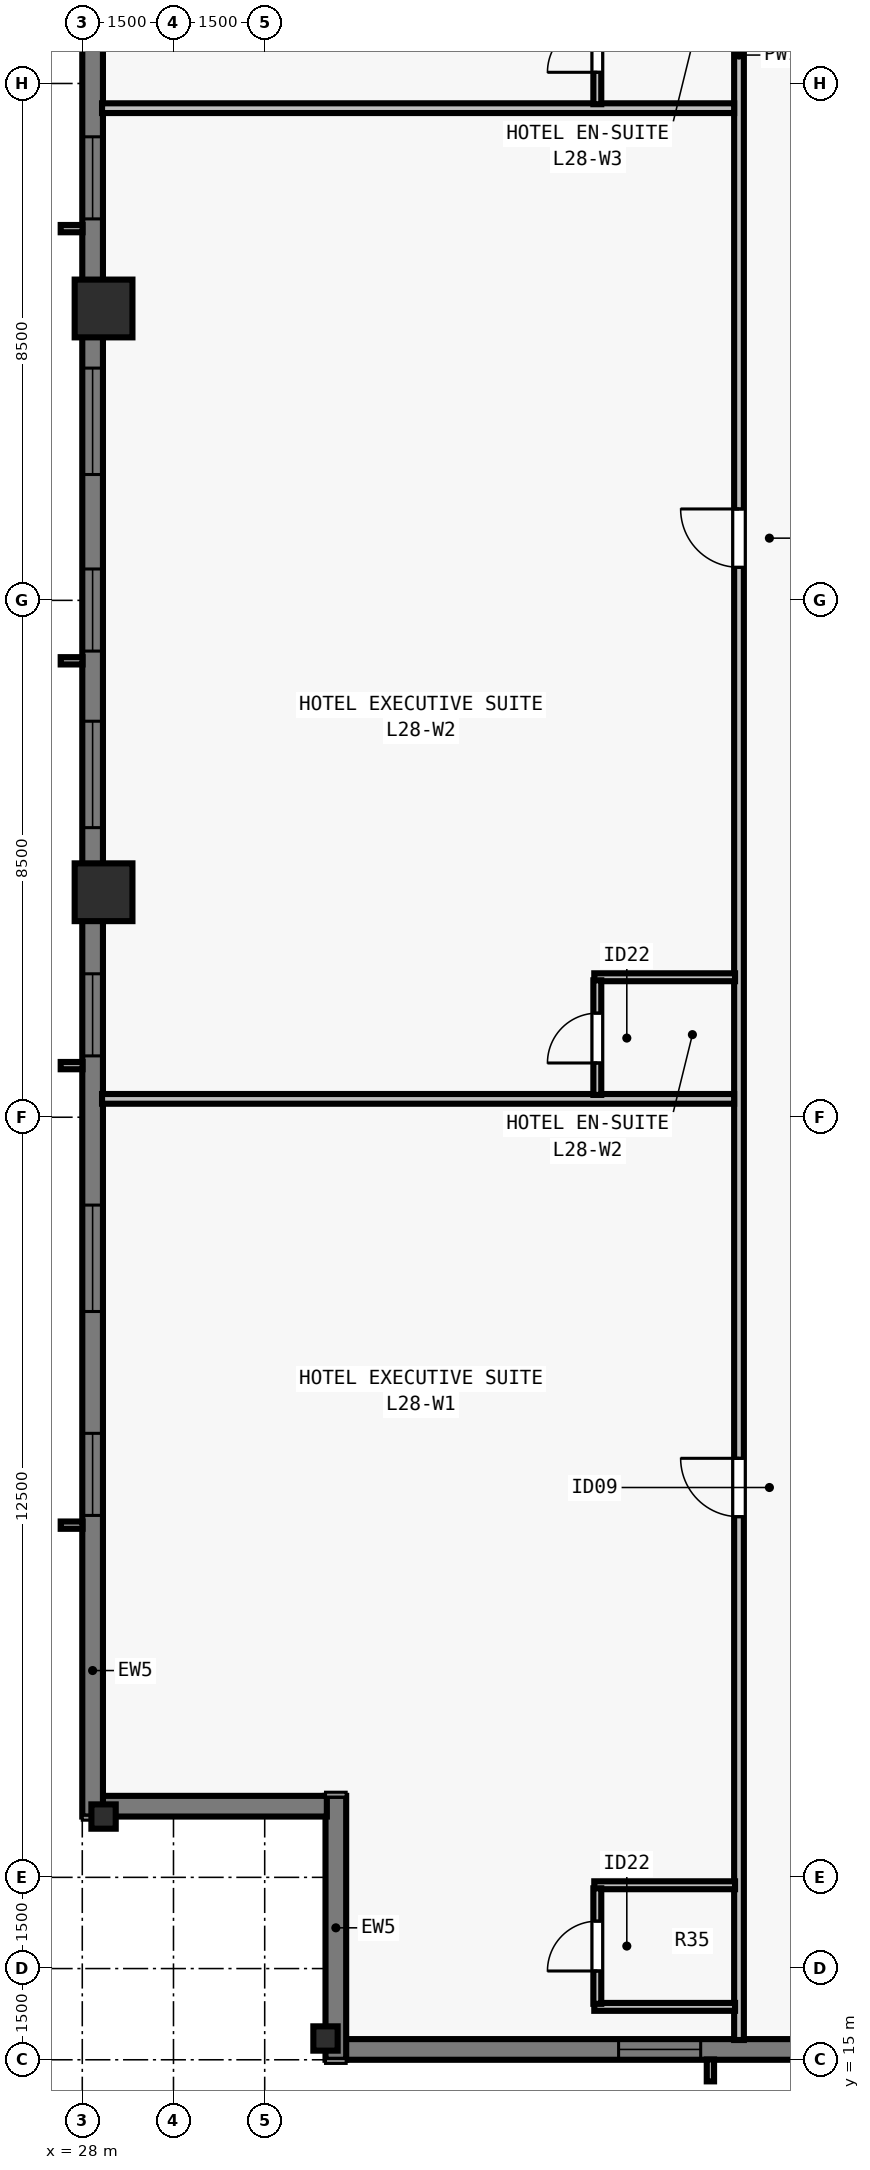
"""IFC4 building model, lengths in metres.
Left out: names, types, materials, properties, quantities, classifications, styles, units other than length and angle.
Written with IfcOpenShell. Run it as: python <this file> out.ifc"""

import sys

from ifc_helpers import new_model, si_unit, direction, frame, frame_2d, origin, origin_2d, place, context, subcontext, project, spatial, rectangle, i_section, extrude, element, fill, save


model = new_model("IFC4")
c1 = context("Model", 3, precision=1e-05, world=origin(), true_north=direction((0.0, 1.0)))
c2 = subcontext(c1, "Body", "Model", "MODEL_VIEW")
j1 = project(units=[si_unit("LENGTHUNIT", "METRE"), si_unit("PLANEANGLEUNIT", "RADIAN")], contexts=[c1])
p1 = place(None, origin())
s1 = spatial("IfcSite", under=j1, at=p1, CompositionType="ELEMENT")
p2 = place(p1, origin())
s2 = spatial("IfcBuilding", under=s1, at=p2, CompositionType="ELEMENT")
p3 = place(p2, frame((0.0, 0.0, 106.0)))
s3 = spatial("IfcBuildingStorey", under=s2, at=p3, CompositionType="ELEMENT", Elevation=106.0)
p4 = place(p3, frame((32.0, 15.35, 0.0), z_axis=(0.0, 0.0, 1.0), x_axis=(1.0, 0.0, 0.0)))
e1 = element("IfcColumn", 1, at=p4, inside=s3, PredefinedType="COLUMN", context=c2, shape_type="SweptSolid", body=[
    extrude(i_section(OverallWidth=0.4, OverallDepth=0.4, WebThickness=0.022, FlangeThickness=0.036, at=origin_2d()), origin(), (0.0, 0.0, 1.0), 3.5),
])
for number, where, z_axis, x_axis in (
    (2, (28.35, 43.8, 0.0), (0.0, 0.0, 1.0), (0.0, 1.0, 0.0)),
    (3, (28.35, 34.2, 0.0), (0.0, 0.0, 1.0), (0.0, 1.0, 0.0)),
):
    element("IfcColumn", number, at=place(p3, frame(where, z_axis=z_axis, x_axis=x_axis)), inside=s3, PredefinedType="COLUMN", context=c2, shape_type="SweptSolid", body=[
        extrude(rectangle(XDim=0.95, YDim=0.95, at=origin_2d()), origin(), (0.0, 0.0, 1.0), 3.5),
    ])
p5 = place(p3, frame((28.35, 19.0, 0.0), z_axis=(0.0, 0.0, 1.0), x_axis=(0.0, 1.0, 0.0)))
e4 = element("IfcColumn", 4, at=p5, inside=s3, PredefinedType="COLUMN", context=c2, shape_type="SweptSolid", body=[
    extrude(i_section(OverallWidth=0.4, OverallDepth=0.4, WebThickness=0.022, FlangeThickness=0.036, at=origin_2d()), origin(), (0.0, 0.0, 1.0), 3.5),
])
p6 = place(p3, frame((72.0, 15.17, 0.0), z_axis=(0.0, 0.0, 1.0), x_axis=(-1.0, 0.0, 0.0)))
e5 = element("IfcWall", 5, at=p6, inside=s3, PredefinedType="SOLIDWALL", context=c2, shape_type="SweptSolid", body=[
    extrude(rectangle(XDim=39.682, YDim=0.34, at=frame_2d((19.841, 0.0))), origin(), (0.0, 0.0, 1.0), 3.28),
])
p7 = place(p6, frame((4.952, 0.0, 0.8)))
e6 = element("IfcOpeningElement", 6, at=p7, cuts=e5, PredefinedType="OPENING", context=c2, shape_type="SweptSolid", body=[
    extrude(rectangle(XDim=1.35, YDim=1.66, at=frame_2d((0.675, 0.83))), frame((0.0, 0.18, 0.0), z_axis=(0.0, -1.0, 0.0), x_axis=(1.0, 0.0, 0.0)), (0.0, 0.0, 1.0), 0.36),
])
p8 = place(p6, frame((9.555, 0.0, 0.8)))
e7 = element("IfcOpeningElement", 7, at=p8, cuts=e5, PredefinedType="OPENING", context=c2, shape_type="SweptSolid", body=[
    extrude(rectangle(XDim=1.75, YDim=1.66, at=frame_2d((0.875, 0.83))), frame((0.0, 0.18, 0.0), z_axis=(0.0, -1.0, 0.0), x_axis=(1.0, 0.0, 0.0)), (0.0, 0.0, 1.0), 0.36),
])
p9 = place(p6, frame((12.059, 0.0, 0.8)))
e8 = element("IfcOpeningElement", 8, at=p9, cuts=e5, PredefinedType="OPENING", context=c2, shape_type="SweptSolid", body=[
    extrude(rectangle(XDim=1.35, YDim=1.66, at=frame_2d((0.675, 0.83))), frame((0.0, 0.18, 0.0), z_axis=(0.0, -1.0, 0.0), x_axis=(1.0, 0.0, 0.0)), (0.0, 0.0, 1.0), 0.36),
])
p10 = place(p6, frame((16.262, 0.0, 0.8)))
e9 = element("IfcOpeningElement", 9, at=p10, cuts=e5, PredefinedType="OPENING", context=c2, shape_type="SweptSolid", body=[
    extrude(rectangle(XDim=1.75, YDim=1.66, at=frame_2d((0.875, 0.83))), frame((0.0, 0.18, 0.0), z_axis=(0.0, -1.0, 0.0), x_axis=(1.0, 0.0, 0.0)), (0.0, 0.0, 1.0), 0.36),
])
p11 = place(p6, frame((18.716, 0.0, 0.8)))
e10 = element("IfcOpeningElement", 10, at=p11, cuts=e5, PredefinedType="OPENING", context=c2, shape_type="SweptSolid", body=[
    extrude(rectangle(XDim=1.35, YDim=1.66, at=frame_2d((0.675, 0.83))), frame((0.0, 0.18, 0.0), z_axis=(0.0, -1.0, 0.0), x_axis=(1.0, 0.0, 0.0)), (0.0, 0.0, 1.0), 0.36),
])
p12 = place(p6, frame((22.07, 0.0, 0.8)))
e11 = element("IfcOpeningElement", 11, at=p12, cuts=e5, PredefinedType="OPENING", context=c2, shape_type="SweptSolid", body=[
    extrude(rectangle(XDim=1.75, YDim=1.66, at=frame_2d((0.875, 0.83))), frame((0.0, 0.18, 0.0), z_axis=(0.0, -1.0, 0.0), x_axis=(1.0, 0.0, 0.0)), (0.0, 0.0, 1.0), 0.36),
])
p13 = place(p6, frame((26.273, 0.0, 0.8)))
e12 = element("IfcOpeningElement", 12, at=p13, cuts=e5, PredefinedType="OPENING", context=c2, shape_type="SweptSolid", body=[
    extrude(rectangle(XDim=1.35, YDim=1.66, at=frame_2d((0.675, 0.83))), frame((0.0, 0.18, 0.0), z_axis=(0.0, -1.0, 0.0), x_axis=(1.0, 0.0, 0.0)), (0.0, 0.0, 1.0), 0.36),
])
p14 = place(p6, frame((28.777, 0.0, 0.8)))
e13 = element("IfcOpeningElement", 13, at=p14, cuts=e5, PredefinedType="OPENING", context=c2, shape_type="SweptSolid", body=[
    extrude(rectangle(XDim=1.75, YDim=1.66, at=frame_2d((0.875, 0.83))), frame((0.0, 0.18, 0.0), z_axis=(0.0, -1.0, 0.0), x_axis=(1.0, 0.0, 0.0)), (0.0, 0.0, 1.0), 0.36),
])
p15 = place(p6, frame((33.83, 0.0, 0.8)))
e14 = element("IfcOpeningElement", 14, at=p15, cuts=e5, PredefinedType="OPENING", context=c2, shape_type="SweptSolid", body=[
    extrude(rectangle(XDim=1.35, YDim=1.66, at=frame_2d((0.675, 0.83))), frame((0.0, 0.18, 0.0), z_axis=(0.0, -1.0, 0.0), x_axis=(1.0, 0.0, 0.0)), (0.0, 0.0, 1.0), 0.36),
])
p16 = place(p3, frame((32.17, 15.0, 0.0), z_axis=(0.0, 0.0, 1.0), x_axis=(0.0, 1.0, 0.0)))
e15 = element("IfcWall", 15, at=p16, inside=s3, PredefinedType="SOLIDWALL", context=c2, shape_type="SweptSolid", body=[
    extrude(rectangle(XDim=4.34, YDim=0.34, at=frame_2d((2.17, 0.0))), origin(), (0.0, 0.0, 1.0), 3.28),
])
p17 = place(p3, frame((32.022, 19.17, 0.0), z_axis=(0.0, 0.0, 1.0), x_axis=(-1.0, 0.0, 0.0)))
e16 = element("IfcWall", 16, at=p17, inside=s3, PredefinedType="SOLIDWALL", context=c2, shape_type="SweptSolid", body=[
    extrude(rectangle(XDim=3.704, YDim=0.34, at=frame_2d((1.852, 0.0))), origin(), (0.0, 0.0, 1.0), 3.28),
])
p18 = place(p3, frame((28.17, 19.0, 0.0), z_axis=(0.0, 0.0, 1.0), x_axis=(0.0, 1.0, 0.0)))
e17 = element("IfcWall", 17, at=p18, inside=s3, PredefinedType="SOLIDWALL", context=c2, shape_type="SweptSolid", body=[
    extrude(rectangle(XDim=39.682, YDim=0.34, at=frame_2d((19.841, 0.0))), origin(), (0.0, 0.0, 1.0), 3.28),
])
p19 = place(p18, frame((4.952, 0.0, 0.8)))
e18 = element("IfcOpeningElement", 18, at=p19, cuts=e17, PredefinedType="OPENING", context=c2, shape_type="SweptSolid", body=[
    extrude(rectangle(XDim=1.35, YDim=1.66, at=frame_2d((0.675, 0.83))), frame((0.0, 0.18, 0.0), z_axis=(0.0, -1.0, 0.0), x_axis=(1.0, 0.0, 0.0)), (0.0, 0.0, 1.0), 0.36),
])
p20 = place(p18, frame((8.305, 0.0, 0.8)))
e19 = element("IfcOpeningElement", 19, at=p20, cuts=e17, PredefinedType="OPENING", context=c2, shape_type="SweptSolid", body=[
    extrude(rectangle(XDim=1.75, YDim=1.66, at=frame_2d((0.875, 0.83))), frame((0.0, 0.18, 0.0), z_axis=(0.0, -1.0, 0.0), x_axis=(1.0, 0.0, 0.0)), (0.0, 0.0, 1.0), 0.36),
])
p21 = place(p18, frame((12.509, 0.0, 0.8)))
e20 = element("IfcOpeningElement", 20, at=p21, cuts=e17, PredefinedType="OPENING", context=c2, shape_type="SweptSolid", body=[
    extrude(rectangle(XDim=1.35, YDim=1.66, at=frame_2d((0.675, 0.83))), frame((0.0, 0.18, 0.0), z_axis=(0.0, -1.0, 0.0), x_axis=(1.0, 0.0, 0.0)), (0.0, 0.0, 1.0), 0.36),
])
p22 = place(p18, frame((16.262, 0.0, 0.8)))
e21 = element("IfcOpeningElement", 21, at=p22, cuts=e17, PredefinedType="OPENING", context=c2, shape_type="SweptSolid", body=[
    extrude(rectangle(XDim=1.75, YDim=1.66, at=frame_2d((0.875, 0.83))), frame((0.0, 0.18, 0.0), z_axis=(0.0, -1.0, 0.0), x_axis=(1.0, 0.0, 0.0)), (0.0, 0.0, 1.0), 0.36),
])
p23 = place(p18, frame((19.166, 0.0, 0.8)))
e22 = element("IfcOpeningElement", 22, at=p23, cuts=e17, PredefinedType="OPENING", context=c2, shape_type="SweptSolid", body=[
    extrude(rectangle(XDim=1.35, YDim=1.66, at=frame_2d((0.675, 0.83))), frame((0.0, 0.18, 0.0), z_axis=(0.0, -1.0, 0.0), x_axis=(1.0, 0.0, 0.0)), (0.0, 0.0, 1.0), 0.36),
])
p24 = place(p18, frame((22.07, 0.0, 0.8)))
e23 = element("IfcOpeningElement", 23, at=p24, cuts=e17, PredefinedType="OPENING", context=c2, shape_type="SweptSolid", body=[
    extrude(rectangle(XDim=1.75, YDim=1.66, at=frame_2d((0.875, 0.83))), frame((0.0, 0.18, 0.0), z_axis=(0.0, -1.0, 0.0), x_axis=(1.0, 0.0, 0.0)), (0.0, 0.0, 1.0), 0.36),
])
p25 = place(p18, frame((26.273, 0.0, 0.8)))
e24 = element("IfcOpeningElement", 24, at=p25, cuts=e17, PredefinedType="OPENING", context=c2, shape_type="SweptSolid", body=[
    extrude(rectangle(XDim=1.35, YDim=1.66, at=frame_2d((0.675, 0.83))), frame((0.0, 0.18, 0.0), z_axis=(0.0, -1.0, 0.0), x_axis=(1.0, 0.0, 0.0)), (0.0, 0.0, 1.0), 0.36),
])
p26 = place(p18, frame((29.627, 0.0, 0.8)))
e25 = element("IfcOpeningElement", 25, at=p26, cuts=e17, PredefinedType="OPENING", context=c2, shape_type="SweptSolid", body=[
    extrude(rectangle(XDim=1.75, YDim=1.66, at=frame_2d((0.875, 0.83))), frame((0.0, 0.18, 0.0), z_axis=(0.0, -1.0, 0.0), x_axis=(1.0, 0.0, 0.0)), (0.0, 0.0, 1.0), 0.36),
])
p27 = place(p18, frame((33.38, 0.0, 0.8)))
e26 = element("IfcOpeningElement", 26, at=p27, cuts=e17, PredefinedType="OPENING", context=c2, shape_type="SweptSolid", body=[
    extrude(rectangle(XDim=1.35, YDim=1.66, at=frame_2d((0.675, 0.83))), frame((0.0, 0.18, 0.0), z_axis=(0.0, -1.0, 0.0), x_axis=(1.0, 0.0, 0.0)), (0.0, 0.0, 1.0), 0.36),
])
p28 = place(p3, frame((38.8, 15.325, 0.0), z_axis=(0.0, 0.0, 1.0), x_axis=(0.0, 1.0, 0.0)))
e27 = element("IfcWall", 27, at=p28, inside=s3, PredefinedType="PARTITIONING", context=c2, shape_type="SweptSolid", body=[
    extrude(rectangle(XDim=47.35, YDim=0.16, at=frame_2d((23.675, 0.0))), origin(), (0.0, 0.0, 1.0), 2.555),
])
p29 = place(p28, frame((8.606, 0.0, 0.0)))
e28 = element("IfcOpeningElement", 28, at=p29, cuts=e27, PredefinedType="OPENING", context=c2, shape_type="SweptSolid", body=[
    extrude(rectangle(XDim=0.96, YDim=2.15, at=frame_2d((0.48, 1.075))), frame((0.0, 0.09, 0.0), z_axis=(0.0, -1.0, 0.0), x_axis=(1.0, 0.0, 0.0)), (0.0, 0.0, 1.0), 0.18),
])
p30 = place(p28, frame((24.218, 0.0, 0.0)))
e29 = element("IfcOpeningElement", 29, at=p30, cuts=e27, PredefinedType="OPENING", context=c2, shape_type="SweptSolid", body=[
    extrude(rectangle(XDim=0.96, YDim=2.15, at=frame_2d((0.48, 1.075))), frame((0.0, 0.09, 0.0), z_axis=(0.0, -1.0, 0.0), x_axis=(1.0, 0.0, 0.0)), (0.0, 0.0, 1.0), 0.18),
])
p31 = place(p28, frame((40.107, 0.0, 0.0)))
e30 = element("IfcOpeningElement", 30, at=p31, cuts=e27, PredefinedType="OPENING", context=c2, shape_type="SweptSolid", body=[
    extrude(rectangle(XDim=0.96, YDim=2.15, at=frame_2d((0.48, 1.075))), frame((0.0, 0.09, 0.0), z_axis=(0.0, -1.0, 0.0), x_axis=(1.0, 0.0, 0.0)), (0.0, 0.0, 1.0), 0.18),
])
for number, where, z_axis, x_axis in (
    (31, (36.42, 15.87, 0.0), (0.0, 0.0, 1.0), (1.0, 0.0, 0.0)),
    (32, (36.42, 17.87, 0.0), (0.0, 0.0, 1.0), (1.0, 0.0, 0.0)),
):
    element("IfcWall", number, at=place(p3, frame(where, z_axis=z_axis, x_axis=x_axis)), inside=s3, PredefinedType="PLUMBINGWALL", context=c2, shape_type="SweptSolid", body=[
        extrude(rectangle(XDim=2.315, YDim=0.13, at=frame_2d((1.158, 0.0))), origin(), (0.0, 0.0, 1.0), 3.28),
    ])
p32 = place(p3, frame((36.47, 15.92, 0.0), z_axis=(0.0, 0.0, 1.0), x_axis=(0.0, 1.0, 0.0)))
e33 = element("IfcWall", 33, at=p32, inside=s3, PredefinedType="PLUMBINGWALL", context=c2, shape_type="SweptSolid", body=[
    extrude(rectangle(XDim=1.9, YDim=0.13, at=frame_2d((0.95, 0.0))), origin(), (0.0, 0.0, 1.0), 3.28),
])
p33 = place(p32, frame((0.54, 0.0, 0.0)))
e34 = element("IfcOpeningElement", 34, at=p33, cuts=e33, PredefinedType="OPENING", context=c2, shape_type="SweptSolid", body=[
    extrude(rectangle(XDim=0.82, YDim=2.1, at=frame_2d((0.41, 1.05))), frame((0.0, 0.075, 0.0), z_axis=(0.0, -1.0, 0.0), x_axis=(1.0, 0.0, 0.0)), (0.0, 0.0, 1.0), 0.15),
])
p34 = place(p3, frame((28.325, 30.802, 0.0), z_axis=(0.0, 0.0, 1.0), x_axis=(1.0, 0.0, 0.0)))
e35 = element("IfcWall", 35, at=p34, inside=s3, PredefinedType="PARTITIONING", context=c2, shape_type="SweptSolid", body=[
    extrude(rectangle(XDim=10.395, YDim=0.16, at=frame_2d((5.198, 0.0))), origin(), (0.0, 0.0, 1.0), 3.28),
])
p35 = place(p3, frame((36.42, 32.802, 0.0), z_axis=(0.0, 0.0, 1.0), x_axis=(1.0, 0.0, 0.0)))
e36 = element("IfcWall", 36, at=p35, inside=s3, PredefinedType="PLUMBINGWALL", context=c2, shape_type="SweptSolid", body=[
    extrude(rectangle(XDim=2.315, YDim=0.13, at=frame_2d((1.158, 0.0))), origin(), (0.0, 0.0, 1.0), 3.28),
])
p36 = place(p3, frame((36.47, 30.867, 0.0), z_axis=(0.0, 0.0, 1.0), x_axis=(0.0, 1.0, 0.0)))
e37 = element("IfcWall", 37, at=p36, inside=s3, PredefinedType="PLUMBINGWALL", context=c2, shape_type="SweptSolid", body=[
    extrude(rectangle(XDim=1.885, YDim=0.13, at=frame_2d((0.942, 0.0))), origin(), (0.0, 0.0, 1.0), 3.28),
])
p37 = place(p36, frame((0.525, 0.0, 0.0)))
e38 = element("IfcOpeningElement", 38, at=p37, cuts=e37, PredefinedType="OPENING", context=c2, shape_type="SweptSolid", body=[
    extrude(rectangle(XDim=0.82, YDim=2.1, at=frame_2d((0.41, 1.05))), frame((0.0, 0.075, 0.0), z_axis=(0.0, -1.0, 0.0), x_axis=(1.0, 0.0, 0.0)), (0.0, 0.0, 1.0), 0.15),
])
p38 = place(p3, frame((28.325, 47.094, 0.0), z_axis=(0.0, 0.0, 1.0), x_axis=(1.0, 0.0, 0.0)))
e39 = element("IfcWall", 39, at=p38, inside=s3, PredefinedType="PARTITIONING", context=c2, shape_type="SweptSolid", body=[
    extrude(rectangle(XDim=10.395, YDim=0.16, at=frame_2d((5.198, 0.0))), origin(), (0.0, 0.0, 1.0), 3.28),
])
p39 = place(p3, frame((36.47, 47.159, 0.0), z_axis=(0.0, 0.0, 1.0), x_axis=(0.0, 1.0, 0.0)))
e40 = element("IfcWall", 40, at=p39, inside=s3, PredefinedType="PLUMBINGWALL", context=c2, shape_type="SweptSolid", body=[
    extrude(rectangle(XDim=1.885, YDim=0.13, at=frame_2d((0.942, 0.0))), origin(), (0.0, 0.0, 1.0), 3.28),
])
p40 = place(p39, frame((0.525, 0.0, 0.0)))
e41 = element("IfcOpeningElement", 41, at=p40, cuts=e40, PredefinedType="OPENING", context=c2, shape_type="SweptSolid", body=[
    extrude(rectangle(XDim=0.82, YDim=2.1, at=frame_2d((0.41, 1.05))), frame((0.0, 0.075, 0.0), z_axis=(0.0, -1.0, 0.0), x_axis=(1.0, 0.0, 0.0)), (0.0, 0.0, 1.0), 0.15),
])
p41 = place(p15, origin())
e42 = element("IfcWindow", 42, at=p41, inside=s3, PartitioningType="SINGLE_PANEL", PredefinedType="WINDOW", context=c2, shape_type="SweptSolid", body=[
    extrude(rectangle(XDim=1.35, YDim=1.66, at=frame_2d((0.675, 0.83))), frame((0.0, -0.05, 0.0), z_axis=(0.0, -1.0, 0.0), x_axis=(1.0, 0.0, 0.0)), (0.0, 0.0, 1.0), 0.06),
])
fill(e14, e42)
p42 = place(p19, origin())
e43 = element("IfcWindow", 43, at=p42, inside=s3, PartitioningType="SINGLE_PANEL", PredefinedType="WINDOW", context=c2, shape_type="SweptSolid", body=[
    extrude(rectangle(XDim=1.35, YDim=1.66, at=frame_2d((0.675, 0.83))), frame((0.0, -0.05, 0.0), z_axis=(0.0, -1.0, 0.0), x_axis=(1.0, 0.0, 0.0)), (0.0, 0.0, 1.0), 0.06),
])
fill(e18, e43)
p43 = place(p20, origin())
e44 = element("IfcWindow", 44, at=p43, inside=s3, PartitioningType="SINGLE_PANEL", PredefinedType="WINDOW", context=c2, shape_type="SweptSolid", body=[
    extrude(rectangle(XDim=1.75, YDim=1.66, at=frame_2d((0.875, 0.83))), frame((0.0, -0.05, 0.0), z_axis=(0.0, -1.0, 0.0), x_axis=(1.0, 0.0, 0.0)), (0.0, 0.0, 1.0), 0.06),
])
fill(e19, e44)
p44 = place(p21, origin())
e45 = element("IfcWindow", 45, at=p44, inside=s3, PartitioningType="SINGLE_PANEL", PredefinedType="WINDOW", context=c2, shape_type="SweptSolid", body=[
    extrude(rectangle(XDim=1.35, YDim=1.66, at=frame_2d((0.675, 0.83))), frame((0.0, -0.05, 0.0), z_axis=(0.0, -1.0, 0.0), x_axis=(1.0, 0.0, 0.0)), (0.0, 0.0, 1.0), 0.06),
])
fill(e20, e45)
p45 = place(p22, origin())
e46 = element("IfcWindow", 46, at=p45, inside=s3, PartitioningType="SINGLE_PANEL", PredefinedType="WINDOW", context=c2, shape_type="SweptSolid", body=[
    extrude(rectangle(XDim=1.75, YDim=1.66, at=frame_2d((0.875, 0.83))), frame((0.0, -0.05, 0.0), z_axis=(0.0, -1.0, 0.0), x_axis=(1.0, 0.0, 0.0)), (0.0, 0.0, 1.0), 0.06),
])
fill(e21, e46)
p46 = place(p23, origin())
e47 = element("IfcWindow", 47, at=p46, inside=s3, PartitioningType="SINGLE_PANEL", PredefinedType="WINDOW", context=c2, shape_type="SweptSolid", body=[
    extrude(rectangle(XDim=1.35, YDim=1.66, at=frame_2d((0.675, 0.83))), frame((0.0, -0.05, 0.0), z_axis=(0.0, -1.0, 0.0), x_axis=(1.0, 0.0, 0.0)), (0.0, 0.0, 1.0), 0.06),
])
fill(e22, e47)
p47 = place(p24, origin())
e48 = element("IfcWindow", 48, at=p47, inside=s3, PartitioningType="SINGLE_PANEL", PredefinedType="WINDOW", context=c2, shape_type="SweptSolid", body=[
    extrude(rectangle(XDim=1.75, YDim=1.66, at=frame_2d((0.875, 0.83))), frame((0.0, -0.05, 0.0), z_axis=(0.0, -1.0, 0.0), x_axis=(1.0, 0.0, 0.0)), (0.0, 0.0, 1.0), 0.06),
])
fill(e23, e48)
p48 = place(p25, origin())
e49 = element("IfcWindow", 49, at=p48, inside=s3, PartitioningType="SINGLE_PANEL", PredefinedType="WINDOW", context=c2, shape_type="SweptSolid", body=[
    extrude(rectangle(XDim=1.35, YDim=1.66, at=frame_2d((0.675, 0.83))), frame((0.0, -0.05, 0.0), z_axis=(0.0, -1.0, 0.0), x_axis=(1.0, 0.0, 0.0)), (0.0, 0.0, 1.0), 0.06),
])
fill(e24, e49)
p49 = place(p33, origin())
e50 = element("IfcDoor", 50, at=p49, inside=s3, OperationType="SINGLE_SWING_LEFT", PredefinedType="DOOR", context=c2, shape_type="SweptSolid", body=[
    extrude(rectangle(XDim=0.82, YDim=2.1, at=frame_2d((0.41, 1.05))), frame((0.0, 0.025, 0.0), z_axis=(0.0, -1.0, 0.0), x_axis=(1.0, 0.0, 0.0)), (0.0, 0.0, 1.0), 0.05),
])
fill(e34, e50)
p50 = place(p29, origin())
e51 = element("IfcDoor", 51, at=p50, inside=s3, OperationType="SINGLE_SWING_RIGHT", PredefinedType="DOOR", context=c2, shape_type="SweptSolid", body=[
    extrude(rectangle(XDim=0.96, YDim=2.15, at=frame_2d((0.48, 1.075))), frame((0.0, 0.025, 0.0), z_axis=(0.0, -1.0, 0.0), x_axis=(1.0, 0.0, 0.0)), (0.0, 0.0, 1.0), 0.05),
])
fill(e28, e51)
p51 = place(p37, origin())
e52 = element("IfcDoor", 52, at=p51, inside=s3, OperationType="SINGLE_SWING_LEFT", PredefinedType="DOOR", context=c2, shape_type="SweptSolid", body=[
    extrude(rectangle(XDim=0.82, YDim=2.1, at=frame_2d((0.41, 1.05))), frame((0.0, 0.025, 0.0), z_axis=(0.0, -1.0, 0.0), x_axis=(1.0, 0.0, 0.0)), (0.0, 0.0, 1.0), 0.05),
])
fill(e38, e52)
p52 = place(p30, origin())
e53 = element("IfcDoor", 53, at=p52, inside=s3, OperationType="SINGLE_SWING_RIGHT", PredefinedType="DOOR", context=c2, shape_type="SweptSolid", body=[
    extrude(rectangle(XDim=0.96, YDim=2.15, at=frame_2d((0.48, 1.075))), frame((0.0, 0.025, 0.0), z_axis=(0.0, -1.0, 0.0), x_axis=(1.0, 0.0, 0.0)), (0.0, 0.0, 1.0), 0.05),
])
fill(e29, e53)
p53 = place(p40, origin())
e54 = element("IfcDoor", 54, at=p53, inside=s3, OperationType="SINGLE_SWING_LEFT", PredefinedType="DOOR", context=c2, shape_type="SweptSolid", body=[
    extrude(rectangle(XDim=0.82, YDim=2.1, at=frame_2d((0.41, 1.05))), frame((0.0, 0.025, 0.0), z_axis=(0.0, -1.0, 0.0), x_axis=(1.0, 0.0, 0.0)), (0.0, 0.0, 1.0), 0.05),
])
fill(e41, e54)
save(model, sys.argv[1])
